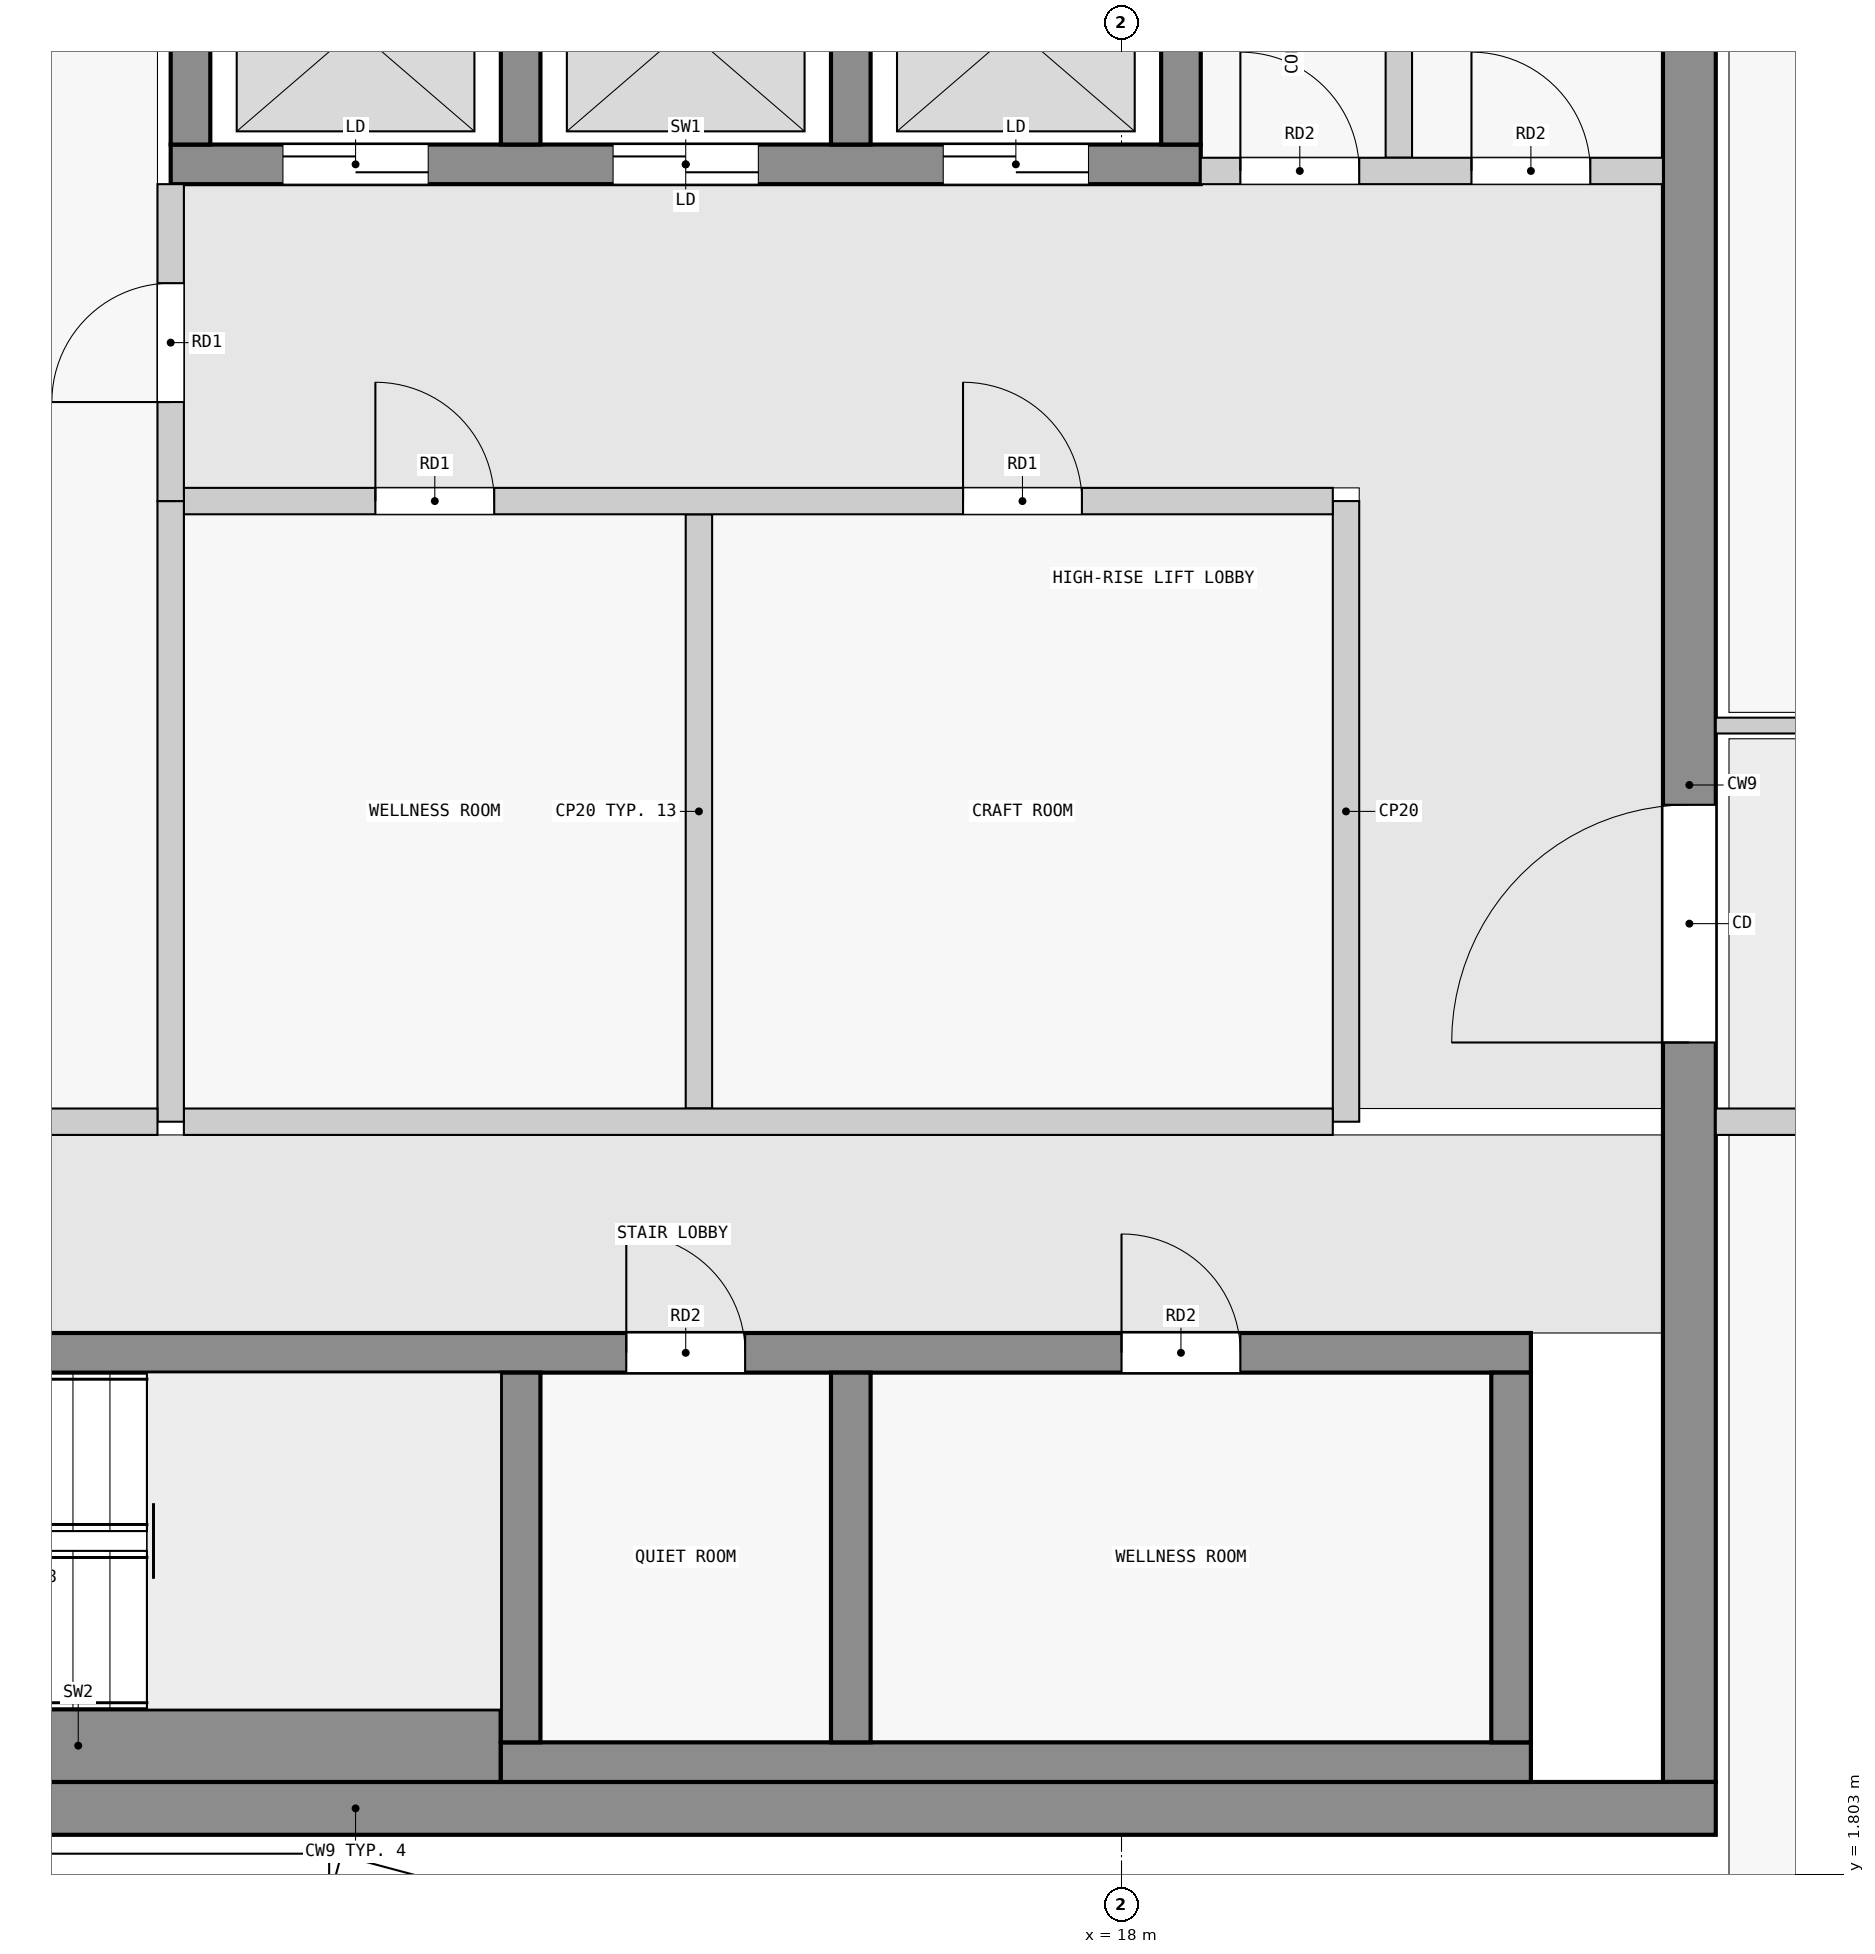
"""IFC4 building model, lengths in metres.
Left out: names, types, materials, properties, quantities, classifications, styles, units other than length and angle.
Written with IfcOpenShell. Run it as: python <this file> out.ifc"""

import sys

from ifc_helpers import new_model, si_unit, direction, frame, frame_2d, origin, place, context, subcontext, project, spatial, rectangle, extrude, element, fill, save


model = new_model("IFC4")
c1 = context("Model", 3, precision=1e-05, world=origin(), true_north=direction((0.0, 1.0)))
c2 = subcontext(c1, "Body", "Model", "MODEL_VIEW")
j1 = project(units=[si_unit("LENGTHUNIT", "METRE"), si_unit("PLANEANGLEUNIT", "RADIAN")], contexts=[c1])
p1 = place(None, origin())
s1 = spatial("IfcSite", under=j1, at=p1, CompositionType="ELEMENT")
p2 = place(p1, origin())
s2 = spatial("IfcBuilding", under=s1, at=p2, CompositionType="ELEMENT")
p3 = place(p2, frame((0.0, 0.0, 298.4)))
s3 = spatial("IfcBuildingStorey", under=s2, at=p3, CompositionType="ELEMENT", Elevation=298.4)
p4 = place(p3, frame((1.9, 2.3, 0.0), z_axis=(0.0, 0.0, 1.0), x_axis=(1.0, 0.0, 0.0)))
e1 = element("IfcWall", 1, at=p4, inside=s3, PredefinedType="SHEAR", context=c2, shape_type="SweptSolid", body=[
    extrude(rectangle(XDim=20.6, YDim=0.4, at=frame_2d((10.3, 0.0))), origin(), (0.0, 0.0, 1.0), 3.05),
])
p5 = place(p3, frame((22.3, 2.5, 0.0), z_axis=(0.0, 0.0, 1.0), x_axis=(0.0, 1.0, 0.0)))
e2 = element("IfcWall", 2, at=p5, inside=s3, PredefinedType="SHEAR", context=c2, shape_type="SweptSolid", body=[
    extrude(rectangle(XDim=15.1, YDim=0.4, at=frame_2d((7.55, 0.0))), origin(), (0.0, 0.0, 1.0), 3.05),
])
p6 = place(p5, frame((5.6, 0.0, 0.0)))
e3 = element("IfcOpeningElement", 3, at=p6, cuts=e2, PredefinedType="OPENING", context=c2, shape_type="SweptSolid", body=[
    extrude(rectangle(XDim=1.8, YDim=2.1, at=frame_2d((0.9, 1.05))), frame((0.0, 0.21, 0.0), z_axis=(0.0, -1.0, 0.0), x_axis=(1.0, 0.0, 0.0)), (0.0, 0.0, 1.0), 0.42),
])
p7 = place(p3, frame((6.9, 2.775, 0.0), z_axis=(0.0, 0.0, 1.0), x_axis=(1.0, 0.0, 0.0)))
e4 = element("IfcWall", 4, at=p7, inside=s3, PredefinedType="SHEAR", context=c2, shape_type="SweptSolid", body=[
    extrude(rectangle(XDim=6.4, YDim=0.55, at=frame_2d((3.2, 0.0))), origin(), (0.0, 0.0, 1.0), 3.05),
])
p8 = place(p3, frame((13.3, 2.65, 0.0), z_axis=(0.0, 0.0, 1.0), x_axis=(1.0, 0.0, 0.0)))
e5 = element("IfcWall", 5, at=p8, inside=s3, PredefinedType="SHEAR", context=c2, shape_type="SweptSolid", body=[
    extrude(rectangle(XDim=7.8, YDim=0.3, at=frame_2d((3.9, 0.0))), origin(), (0.0, 0.0, 1.0), 3.05),
])
for number, where, z_axis, x_axis in (
    (6, (13.45, 2.8, 0.0), (0.0, 0.0, 1.0), (0.0, 1.0, 0.0)),
    (7, (15.95, 2.8, 0.0), (0.0, 0.0, 1.0), (0.0, 1.0, 0.0)),
    (8, (20.95, 2.8, 0.0), (0.0, 0.0, 1.0), (0.0, 1.0, 0.0)),
):
    element("IfcWall", number, at=place(p3, frame(where, z_axis=z_axis, x_axis=x_axis)), inside=s3, PredefinedType="SHEAR", context=c2, shape_type="SweptSolid", body=[
        extrude(rectangle(XDim=2.8, YDim=0.3, at=frame_2d((1.4, 0.0))), origin(), (0.0, 0.0, 1.0), 3.05),
    ])
p9 = place(p3, frame((2.3, 5.75, 0.0), z_axis=(0.0, 0.0, 1.0), x_axis=(1.0, 0.0, 0.0)))
e9 = element("IfcWall", 9, at=p9, inside=s3, PredefinedType="SHEAR", context=c2, shape_type="SweptSolid", body=[
    extrude(rectangle(XDim=18.8, YDim=0.3, at=frame_2d((9.4, 0.0))), origin(), (0.0, 0.0, 1.0), 3.05),
])
p10 = place(p9, frame((4.65, 0.0, 0.0)))
e10 = element("IfcOpeningElement", 10, at=p10, cuts=e9, PredefinedType="OPENING", context=c2, shape_type="SweptSolid", body=[
    extrude(rectangle(XDim=1.1, YDim=2.1, at=frame_2d((0.55, 1.05))), frame((0.0, 0.16, 0.0), z_axis=(0.0, -1.0, 0.0), x_axis=(1.0, 0.0, 0.0)), (0.0, 0.0, 1.0), 0.32),
])
p11 = place(p9, frame((0.45, 0.0, 0.0)))
e11 = element("IfcOpeningElement", 11, at=p11, cuts=e9, PredefinedType="OPENING", context=c2, shape_type="SweptSolid", body=[
    extrude(rectangle(XDim=1.1, YDim=2.1, at=frame_2d((0.55, 1.05))), frame((0.0, 0.16, 0.0), z_axis=(0.0, -1.0, 0.0), x_axis=(1.0, 0.0, 0.0)), (0.0, 0.0, 1.0), 0.32),
])
p12 = place(p9, frame((2.75, 0.0, 0.0)))
e12 = element("IfcOpeningElement", 12, at=p12, cuts=e9, PredefinedType="OPENING", context=c2, shape_type="SweptSolid", body=[
    extrude(rectangle(XDim=1.1, YDim=2.1, at=frame_2d((0.55, 1.05))), frame((0.0, 0.16, 0.0), z_axis=(0.0, -1.0, 0.0), x_axis=(1.0, 0.0, 0.0)), (0.0, 0.0, 1.0), 0.32),
])
p13 = place(p9, frame((11.95, 0.0, 0.0)))
e13 = element("IfcOpeningElement", 13, at=p13, cuts=e9, PredefinedType="OPENING", context=c2, shape_type="SweptSolid", body=[
    extrude(rectangle(XDim=0.9, YDim=2.1, at=frame_2d((0.45, 1.05))), frame((0.0, 0.16, 0.0), z_axis=(0.0, -1.0, 0.0), x_axis=(1.0, 0.0, 0.0)), (0.0, 0.0, 1.0), 0.32),
])
p14 = place(p9, frame((15.7, 0.0, 0.0)))
e14 = element("IfcOpeningElement", 14, at=p14, cuts=e9, PredefinedType="OPENING", context=c2, shape_type="SweptSolid", body=[
    extrude(rectangle(XDim=0.9, YDim=2.1, at=frame_2d((0.45, 1.05))), frame((0.0, 0.16, 0.0), z_axis=(0.0, -1.0, 0.0), x_axis=(1.0, 0.0, 0.0)), (0.0, 0.0, 1.0), 0.32),
])
p15 = place(p3, frame((10.8, 14.75, 0.0), z_axis=(0.0, 0.0, 1.0), x_axis=(1.0, 0.0, 0.0)))
e15 = element("IfcWall", 15, at=p15, inside=s3, PredefinedType="SHEAR", context=c2, shape_type="SweptSolid", body=[
    extrude(rectangle(XDim=7.8, YDim=0.3, at=frame_2d((3.9, 0.0))), origin(), (0.0, 0.0, 1.0), 3.05),
])
p16 = place(p15, frame((0.85, 0.0, 0.0)))
e16 = element("IfcOpeningElement", 16, at=p16, cuts=e15, PredefinedType="OPENING", context=c2, shape_type="SweptSolid", body=[
    extrude(rectangle(XDim=1.1, YDim=2.1, at=frame_2d((0.55, 1.05))), frame((0.0, 0.16, 0.0), z_axis=(0.0, -1.0, 0.0), x_axis=(1.0, 0.0, 0.0)), (0.0, 0.0, 1.0), 0.32),
])
p17 = place(p15, frame((3.35, 0.0, 0.0)))
e17 = element("IfcOpeningElement", 17, at=p17, cuts=e15, PredefinedType="OPENING", context=c2, shape_type="SweptSolid", body=[
    extrude(rectangle(XDim=1.1, YDim=2.1, at=frame_2d((0.55, 1.05))), frame((0.0, 0.16, 0.0), z_axis=(0.0, -1.0, 0.0), x_axis=(1.0, 0.0, 0.0)), (0.0, 0.0, 1.0), 0.32),
])
p18 = place(p15, frame((5.85, 0.0, 0.0)))
e18 = element("IfcOpeningElement", 18, at=p18, cuts=e15, PredefinedType="OPENING", context=c2, shape_type="SweptSolid", body=[
    extrude(rectangle(XDim=1.1, YDim=2.1, at=frame_2d((0.55, 1.05))), frame((0.0, 0.16, 0.0), z_axis=(0.0, -1.0, 0.0), x_axis=(1.0, 0.0, 0.0)), (0.0, 0.0, 1.0), 0.32),
])
for number, where, z_axis, x_axis in (
    (19, (10.95, 14.9, 0.0), (0.0, 0.0, 1.0), (0.0, 1.0, 0.0)),
    (20, (13.45, 14.9, 0.0), (0.0, 0.0, 1.0), (0.0, 1.0, 0.0)),
    (21, (15.95, 14.9, 0.0), (0.0, 0.0, 1.0), (0.0, 1.0, 0.0)),
    (22, (18.45, 14.9, 0.0), (0.0, 0.0, 1.0), (0.0, 1.0, 0.0)),
):
    element("IfcWall", number, at=place(p3, frame(where, z_axis=z_axis, x_axis=x_axis)), inside=s3, PredefinedType="SHEAR", context=c2, shape_type="SweptSolid", body=[
        extrude(rectangle(XDim=2.0, YDim=0.3, at=frame_2d((1.0, 0.0))), origin(), (0.0, 0.0, 1.0), 3.05),
    ])
p19 = place(p3, frame((7.1, 7.5, 0.0), z_axis=(0.0, 0.0, 1.0), x_axis=(1.0, 0.0, 0.0)))
e23 = element("IfcWall", 23, at=p19, inside=s3, PredefinedType="PARTITIONING", context=c2, shape_type="SweptSolid", body=[
    extrude(rectangle(XDim=3.6, YDim=0.2, at=frame_2d((1.8, 0.0))), origin(), (0.0, 0.0, 1.0), 3.05),
])
p20 = place(p3, frame((10.8, 12.2, 0.0), z_axis=(0.0, 0.0, 1.0), x_axis=(0.0, 1.0, 0.0)))
e24 = element("IfcWall", 24, at=p20, inside=s3, PredefinedType="PARTITIONING", context=c2, shape_type="SweptSolid", body=[
    extrude(rectangle(XDim=2.4, YDim=0.2, at=frame_2d((1.2, 0.0))), origin(), (0.0, 0.0, 1.0), 3.05),
])
p21 = place(p20, frame((0.75, 0.0, 0.0)))
e25 = element("IfcOpeningElement", 25, at=p21, cuts=e24, PredefinedType="OPENING", context=c2, shape_type="SweptSolid", body=[
    extrude(rectangle(XDim=0.9, YDim=2.1, at=frame_2d((0.45, 1.05))), frame((0.0, 0.11, 0.0), z_axis=(0.0, -1.0, 0.0), x_axis=(1.0, 0.0, 0.0)), (0.0, 0.0, 1.0), 0.22),
])
p22 = place(p3, frame((10.8, 7.5, 0.0), z_axis=(0.0, 0.0, 1.0), x_axis=(0.0, 1.0, 0.0)))
e26 = element("IfcWall", 26, at=p22, inside=s3, PredefinedType="PARTITIONING", context=c2, shape_type="SweptSolid", body=[
    extrude(rectangle(XDim=4.7, YDim=0.2, at=frame_2d((2.35, 0.0))), origin(), (0.0, 0.0, 1.0), 3.05),
])
p23 = place(p3, frame((10.9, 7.5, 0.0), z_axis=(0.0, 0.0, 1.0), x_axis=(1.0, 0.0, 0.0)))
e27 = element("IfcWall", 27, at=p23, inside=s3, PredefinedType="PARTITIONING", context=c2, shape_type="SweptSolid", body=[
    extrude(rectangle(XDim=8.7, YDim=0.2, at=frame_2d((4.35, 0.0))), origin(), (0.0, 0.0, 1.0), 3.05),
])
p24 = place(p3, frame((19.7, 7.5, 0.0), z_axis=(0.0, 0.0, 1.0), x_axis=(0.0, 1.0, 0.0)))
e28 = element("IfcWall", 28, at=p24, inside=s3, PredefinedType="PARTITIONING", context=c2, shape_type="SweptSolid", body=[
    extrude(rectangle(XDim=4.7, YDim=0.2, at=frame_2d((2.35, 0.0))), origin(), (0.0, 0.0, 1.0), 3.05),
])
p25 = place(p3, frame((10.9, 12.2, 0.0), z_axis=(0.0, 0.0, 1.0), x_axis=(1.0, 0.0, 0.0)))
e29 = element("IfcWall", 29, at=p25, inside=s3, PredefinedType="PARTITIONING", context=c2, shape_type="SweptSolid", body=[
    extrude(rectangle(XDim=8.7, YDim=0.2, at=frame_2d((4.35, 0.0))), origin(), (0.0, 0.0, 1.0), 3.05),
])
p26 = place(p25, frame((1.45, 0.0, 0.0)))
e30 = element("IfcOpeningElement", 30, at=p26, cuts=e29, PredefinedType="OPENING", context=c2, shape_type="SweptSolid", body=[
    extrude(rectangle(XDim=0.9, YDim=2.1, at=frame_2d((0.45, 1.05))), frame((0.0, 0.11, 0.0), z_axis=(0.0, -1.0, 0.0), x_axis=(1.0, 0.0, 0.0)), (0.0, 0.0, 1.0), 0.22),
])
p27 = place(p25, frame((5.9, 0.0, 0.0)))
e31 = element("IfcOpeningElement", 31, at=p27, cuts=e29, PredefinedType="OPENING", context=c2, shape_type="SweptSolid", body=[
    extrude(rectangle(XDim=0.9, YDim=2.1, at=frame_2d((0.45, 1.05))), frame((0.0, 0.11, 0.0), z_axis=(0.0, -1.0, 0.0), x_axis=(1.0, 0.0, 0.0)), (0.0, 0.0, 1.0), 0.22),
])
p28 = place(p3, frame((14.8, 7.6, 0.0), z_axis=(0.0, 0.0, 1.0), x_axis=(0.0, 1.0, 0.0)))
e32 = element("IfcWall", 32, at=p28, inside=s3, PredefinedType="PARTITIONING", context=c2, shape_type="SweptSolid", body=[
    extrude(rectangle(XDim=4.5, YDim=0.2, at=frame_2d((2.25, 0.0))), origin(), (0.0, 0.0, 1.0), 3.05),
])
p29 = place(p3, frame((18.6, 14.7, 0.0), z_axis=(0.0, 0.0, 1.0), x_axis=(1.0, 0.0, 0.0)))
e33 = element("IfcWall", 33, at=p29, inside=s3, PredefinedType="PARTITIONING", context=c2, shape_type="SweptSolid", body=[
    extrude(rectangle(XDim=3.5, YDim=0.2, at=frame_2d((1.75, 0.0))), origin(), (0.0, 0.0, 1.0), 3.05),
])
p30 = place(p29, frame((0.3, 0.0, 0.0)))
e34 = element("IfcOpeningElement", 34, at=p30, cuts=e33, PredefinedType="OPENING", context=c2, shape_type="SweptSolid", body=[
    extrude(rectangle(XDim=0.9, YDim=2.1, at=frame_2d((0.45, 1.05))), frame((0.0, 0.11, 0.0), z_axis=(0.0, -1.0, 0.0), x_axis=(1.0, 0.0, 0.0)), (0.0, 0.0, 1.0), 0.22),
])
p31 = place(p29, frame((2.05, 0.0, 0.0)))
e35 = element("IfcOpeningElement", 35, at=p31, cuts=e33, PredefinedType="OPENING", context=c2, shape_type="SweptSolid", body=[
    extrude(rectangle(XDim=0.9, YDim=2.1, at=frame_2d((0.45, 1.05))), frame((0.0, 0.11, 0.0), z_axis=(0.0, -1.0, 0.0), x_axis=(1.0, 0.0, 0.0)), (0.0, 0.0, 1.0), 0.22),
])
p32 = place(p3, frame((20.1, 14.8, 0.0), z_axis=(0.0, 0.0, 1.0), x_axis=(0.0, 1.0, 0.0)))
e36 = element("IfcWall", 36, at=p32, inside=s3, PredefinedType="PARTITIONING", context=c2, shape_type="SweptSolid", body=[
    extrude(rectangle(XDim=2.8, YDim=0.2, at=frame_2d((1.4, 0.0))), origin(), (0.0, 0.0, 1.0), 3.05),
])
p33 = place(p3, frame((22.5, 10.5, 0.0), z_axis=(0.0, 0.0, 1.0), x_axis=(1.0, 0.0, 0.0)))
e37 = element("IfcWall", 37, at=p33, inside=s3, PredefinedType="PARTITIONING", context=c2, shape_type="SweptSolid", body=[
    extrude(rectangle(XDim=4.5, YDim=0.12, at=frame_2d((2.25, 0.0))), origin(), (0.0, 0.0, 1.0), 3.05),
])
p34 = place(p3, frame((27.0, 7.5, 0.0), z_axis=(0.0, 0.0, 1.0), x_axis=(-1.0, 0.0, 0.0)))
e38 = element("IfcWall", 38, at=p34, inside=s3, PredefinedType="PARTITIONING", context=c2, shape_type="SweptSolid", body=[
    extrude(rectangle(XDim=4.5, YDim=0.2, at=frame_2d((2.25, 0.0))), origin(), (0.0, 0.0, 1.0), 3.05),
])
p35 = place(p21, origin())
e39 = element("IfcDoor", 39, at=p35, inside=s3, OperationType="SINGLE_SWING_LEFT", PredefinedType="DOOR", context=c2, shape_type="SweptSolid", body=[
    extrude(rectangle(XDim=0.9, YDim=2.1, at=frame_2d((0.45, 1.05))), frame((0.0, 0.025, 0.0), z_axis=(0.0, -1.0, 0.0), x_axis=(1.0, 0.0, 0.0)), (0.0, 0.0, 1.0), 0.05),
])
fill(e25, e39)
p36 = place(p26, origin())
e40 = element("IfcDoor", 40, at=p36, inside=s3, OperationType="SINGLE_SWING_LEFT", PredefinedType="DOOR", context=c2, shape_type="SweptSolid", body=[
    extrude(rectangle(XDim=0.9, YDim=2.1, at=frame_2d((0.45, 1.05))), frame((0.0, 0.025, 0.0), z_axis=(0.0, -1.0, 0.0), x_axis=(1.0, 0.0, 0.0)), (0.0, 0.0, 1.0), 0.05),
])
fill(e30, e40)
p37 = place(p27, origin())
e41 = element("IfcDoor", 41, at=p37, inside=s3, OperationType="SINGLE_SWING_LEFT", PredefinedType="DOOR", context=c2, shape_type="SweptSolid", body=[
    extrude(rectangle(XDim=0.9, YDim=2.1, at=frame_2d((0.45, 1.05))), frame((0.0, 0.025, 0.0), z_axis=(0.0, -1.0, 0.0), x_axis=(1.0, 0.0, 0.0)), (0.0, 0.0, 1.0), 0.05),
])
fill(e31, e41)
p38 = place(p16, origin())
e42 = element("IfcDoor", 42, at=p38, inside=s3, OperationType="DOUBLE_DOOR_SLIDING", PredefinedType="DOOR", context=c2, shape_type="SweptSolid", body=[
    extrude(rectangle(XDim=1.1, YDim=2.1, at=frame_2d((0.55, 1.05))), frame((0.0, 0.025, 0.0), z_axis=(0.0, -1.0, 0.0), x_axis=(1.0, 0.0, 0.0)), (0.0, 0.0, 1.0), 0.05),
])
fill(e16, e42)
p39 = place(p17, origin())
e43 = element("IfcDoor", 43, at=p39, inside=s3, OperationType="DOUBLE_DOOR_SLIDING", PredefinedType="DOOR", context=c2, shape_type="SweptSolid", body=[
    extrude(rectangle(XDim=1.1, YDim=2.1, at=frame_2d((0.55, 1.05))), frame((0.0, 0.025, 0.0), z_axis=(0.0, -1.0, 0.0), x_axis=(1.0, 0.0, 0.0)), (0.0, 0.0, 1.0), 0.05),
])
fill(e17, e43)
p40 = place(p18, origin())
e44 = element("IfcDoor", 44, at=p40, inside=s3, OperationType="DOUBLE_DOOR_SLIDING", PredefinedType="DOOR", context=c2, shape_type="SweptSolid", body=[
    extrude(rectangle(XDim=1.1, YDim=2.1, at=frame_2d((0.55, 1.05))), frame((0.0, 0.025, 0.0), z_axis=(0.0, -1.0, 0.0), x_axis=(1.0, 0.0, 0.0)), (0.0, 0.0, 1.0), 0.05),
])
fill(e18, e44)
p41 = place(p6, origin())
e45 = element("IfcDoor", 45, at=p41, inside=s3, OperationType="DOUBLE_DOOR_SINGLE_SWING", PredefinedType="DOOR", context=c2, shape_type="SweptSolid", body=[
    extrude(rectangle(XDim=1.8, YDim=2.1, at=frame_2d((0.9, 1.05))), frame((0.0, 0.025, 0.0), z_axis=(0.0, -1.0, 0.0), x_axis=(1.0, 0.0, 0.0)), (0.0, 0.0, 1.0), 0.05),
])
fill(e3, e45)
p42 = place(p30, origin())
e46 = element("IfcDoor", 46, at=p42, inside=s3, OperationType="SINGLE_SWING_LEFT", PredefinedType="DOOR", context=c2, shape_type="SweptSolid", body=[
    extrude(rectangle(XDim=0.9, YDim=2.1, at=frame_2d((0.45, 1.05))), frame((0.0, 0.025, 0.0), z_axis=(0.0, -1.0, 0.0), x_axis=(1.0, 0.0, 0.0)), (0.0, 0.0, 1.0), 0.05),
])
fill(e34, e46)
p43 = place(p31, origin())
e47 = element("IfcDoor", 47, at=p43, inside=s3, OperationType="SINGLE_SWING_LEFT", PredefinedType="DOOR", context=c2, shape_type="SweptSolid", body=[
    extrude(rectangle(XDim=0.9, YDim=2.1, at=frame_2d((0.45, 1.05))), frame((0.0, 0.025, 0.0), z_axis=(0.0, -1.0, 0.0), x_axis=(1.0, 0.0, 0.0)), (0.0, 0.0, 1.0), 0.05),
])
fill(e35, e47)
p44 = place(p13, origin())
e48 = element("IfcDoor", 48, at=p44, inside=s3, OperationType="SINGLE_SWING_LEFT", PredefinedType="DOOR", context=c2, shape_type="SweptSolid", body=[
    extrude(rectangle(XDim=0.9, YDim=2.1, at=frame_2d((0.45, 1.05))), frame((0.0, 0.025, 0.0), z_axis=(0.0, -1.0, 0.0), x_axis=(1.0, 0.0, 0.0)), (0.0, 0.0, 1.0), 0.05),
])
fill(e13, e48)
p45 = place(p14, origin())
e49 = element("IfcDoor", 49, at=p45, inside=s3, OperationType="SINGLE_SWING_LEFT", PredefinedType="DOOR", context=c2, shape_type="SweptSolid", body=[
    extrude(rectangle(XDim=0.9, YDim=2.1, at=frame_2d((0.45, 1.05))), frame((0.0, 0.025, 0.0), z_axis=(0.0, -1.0, 0.0), x_axis=(1.0, 0.0, 0.0)), (0.0, 0.0, 1.0), 0.05),
])
fill(e14, e49)
save(model, sys.argv[1])
